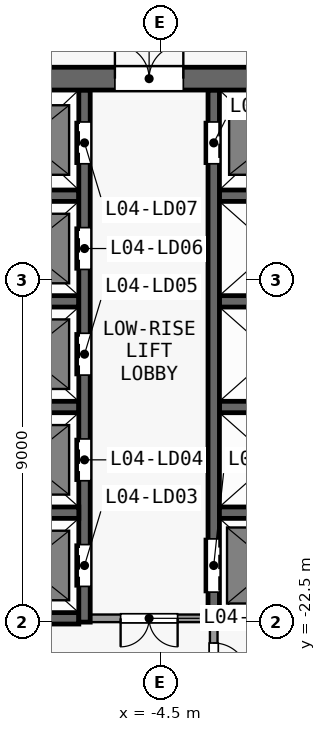
"""IFC4 building model, lengths in metres.
Left out: names, types, materials, properties, quantities, classifications, styles, units other than length and angle.
Written with IfcOpenShell. Run it as: python <this file> out.ifc"""

import sys

from ifc_helpers import new_model, si_unit, direction, frame, frame_2d, origin, place, context, subcontext, project, spatial, rectangle, extrude, element, fill, save


model = new_model("IFC4")
c1 = context("Model", 3, precision=1e-05, world=origin(), true_north=direction((0.0, 1.0)))
c2 = subcontext(c1, "Body", "Model", "MODEL_VIEW")
j1 = project(units=[si_unit("LENGTHUNIT", "METRE"), si_unit("PLANEANGLEUNIT", "RADIAN")], contexts=[c1])
p1 = place(None, origin())
s1 = spatial("IfcSite", under=j1, at=p1, CompositionType="ELEMENT")
p2 = place(p1, origin())
s2 = spatial("IfcBuilding", under=s1, at=p2, CompositionType="ELEMENT")
p3 = place(p2, frame((0.0, 0.0, 23.5)))
s3 = spatial("IfcBuildingStorey", under=s2, at=p3, CompositionType="ELEMENT", Elevation=23.5)
p4 = place(p3, frame((-13.5, -8.2, 0.0), z_axis=(0.0, 0.0, 1.0), x_axis=(1.0, 0.0, 0.0)))
e1 = element("IfcWall", 1, at=p4, inside=s3, PredefinedType="SHEAR", context=c2, shape_type="SweptSolid", body=[
    extrude(rectangle(XDim=27.0, YDim=0.6, at=frame_2d((13.5, 0.0))), origin(), (0.0, 0.0, 1.0), 4.15),
])
p5 = place(p4, frame((7.8, 0.0, 0.0)))
e2 = element("IfcOpeningElement", 2, at=p5, cuts=e1, PredefinedType="OPENING", context=c2, shape_type="SweptSolid", body=[
    extrude(rectangle(XDim=1.8, YDim=2.1, at=frame_2d((0.9, 1.05))), frame((0.0, 0.31, 0.0), z_axis=(0.0, -1.0, 0.0), x_axis=(1.0, 0.0, 0.0)), (0.0, 0.0, 1.0), 0.62),
])
p6 = place(p4, frame((17.4, 0.0, 0.0)))
e3 = element("IfcOpeningElement", 3, at=p6, cuts=e1, PredefinedType="OPENING", context=c2, shape_type="SweptSolid", body=[
    extrude(rectangle(XDim=1.8, YDim=2.1, at=frame_2d((0.9, 1.05))), frame((0.0, 0.31, 0.0), z_axis=(0.0, -1.0, 0.0), x_axis=(1.0, 0.0, 0.0)), (0.0, 0.0, 1.0), 0.62),
])
p7 = place(p4, frame((2.725, 0.0, 0.0)))
e4 = element("IfcOpeningElement", 4, at=p7, cuts=e1, PredefinedType="OPENING", context=c2, shape_type="SweptSolid", body=[
    extrude(rectangle(XDim=0.9, YDim=2.1, at=frame_2d((0.45, 1.05))), frame((0.0, 0.31, 0.0), z_axis=(0.0, -1.0, 0.0), x_axis=(1.0, 0.0, 0.0)), (0.0, 0.0, 1.0), 0.62),
])
p8 = place(p4, frame((23.375, 0.0, 0.0)))
e5 = element("IfcOpeningElement", 5, at=p8, cuts=e1, PredefinedType="OPENING", context=c2, shape_type="SweptSolid", body=[
    extrude(rectangle(XDim=0.9, YDim=2.1, at=frame_2d((0.45, 1.05))), frame((0.0, 0.31, 0.0), z_axis=(0.0, -1.0, 0.0), x_axis=(1.0, 0.0, 0.0)), (0.0, 0.0, 1.0), 0.62),
])
p9 = place(p3, frame((-9.45, -22.4, 0.0), z_axis=(0.0, 0.0, 1.0), x_axis=(1.0, 0.0, 0.0)))
e6 = element("IfcWall", 6, at=p9, inside=s3, PredefinedType="SHEAR", context=c2, shape_type="SweptSolid", body=[
    extrude(rectangle(XDim=2.8, YDim=0.3, at=frame_2d((1.4, 0.0))), origin(), (0.0, 0.0, 1.0), 4.15),
])
p10 = place(p3, frame((-3.25, -22.4, 0.0), z_axis=(0.0, 0.0, 1.0), x_axis=(-1.0, 0.0, 0.0)))
e7 = element("IfcWall", 7, at=p10, inside=s3, PredefinedType="PARTITIONING", context=c2, shape_type="SweptSolid", body=[
    extrude(rectangle(XDim=3.1, YDim=0.2, at=frame_2d((1.55, 0.0))), origin(), (0.0, 0.0, 1.0), 4.15),
])
p11 = place(p10, frame((0.8, 0.0, 0.0)))
e8 = element("IfcOpeningElement", 8, at=p11, cuts=e7, PredefinedType="OPENING", context=c2, shape_type="SweptSolid", body=[
    extrude(rectangle(XDim=1.5, YDim=2.1, at=frame_2d((0.75, 1.05))), frame((0.0, 0.11, 0.0), z_axis=(0.0, -1.0, 0.0), x_axis=(1.0, 0.0, 0.0)), (0.0, 0.0, 1.0), 0.22),
])
p12 = place(p3, frame((-2.95, -22.4, 0.0), z_axis=(0.0, 0.0, 1.0), x_axis=(1.0, 0.0, 0.0)))
e9 = element("IfcWall", 9, at=p12, inside=s3, PredefinedType="SHEAR", context=c2, shape_type="SweptSolid", body=[
    extrude(rectangle(XDim=6.2, YDim=0.3, at=frame_2d((3.1, 0.0))), origin(), (0.0, 0.0, 1.0), 4.15),
])
for number, where, z_axis, x_axis in (
    (10, (-9.45, -19.62, 0.0), (0.0, 0.0, 1.0), (1.0, 0.0, 0.0)),
    (11, (-2.95, -19.62, 0.0), (0.0, 0.0, 1.0), (1.0, 0.0, 0.0)),
    (12, (-9.45, -16.84, 0.0), (0.0, 0.0, 1.0), (1.0, 0.0, 0.0)),
    (13, (-2.95, -16.84, 0.0), (0.0, 0.0, 1.0), (1.0, 0.0, 0.0)),
    (14, (-9.45, -14.06, 0.0), (0.0, 0.0, 1.0), (1.0, 0.0, 0.0)),
    (15, (-2.95, -14.06, 0.0), (0.0, 0.0, 1.0), (1.0, 0.0, 0.0)),
    (16, (-9.45, -11.28, 0.0), (0.0, 0.0, 1.0), (1.0, 0.0, 0.0)),
    (17, (-2.95, -11.28, 0.0), (0.0, 0.0, 1.0), (1.0, 0.0, 0.0)),
):
    element("IfcWall", number, at=place(p3, frame(where, z_axis=z_axis, x_axis=x_axis)), inside=s3, PredefinedType="SHEAR", context=c2, shape_type="SweptSolid", body=[
        extrude(rectangle(XDim=2.8, YDim=0.3, at=frame_2d((1.4, 0.0))), origin(), (0.0, 0.0, 1.0), 4.15),
    ])
p13 = place(p3, frame((-6.5, -22.5, 0.0), z_axis=(0.0, 0.0, 1.0), x_axis=(0.0, 1.0, 0.0)))
e18 = element("IfcWall", 18, at=p13, inside=s3, PredefinedType="SHEAR", context=c2, shape_type="SweptSolid", body=[
    extrude(rectangle(XDim=14.0, YDim=0.3, at=frame_2d((7.0, 0.0))), origin(), (0.0, 0.0, 1.0), 4.15),
])
p14 = place(p13, frame((0.94, 0.0, 0.0)))
e19 = element("IfcOpeningElement", 19, at=p14, cuts=e18, PredefinedType="OPENING", context=c2, shape_type="SweptSolid", body=[
    extrude(rectangle(XDim=1.1, YDim=2.1, at=frame_2d((0.55, 1.05))), frame((0.0, 0.16, 0.0), z_axis=(0.0, -1.0, 0.0), x_axis=(1.0, 0.0, 0.0)), (0.0, 0.0, 1.0), 0.32),
])
p15 = place(p13, frame((3.72, 0.0, 0.0)))
e20 = element("IfcOpeningElement", 20, at=p15, cuts=e18, PredefinedType="OPENING", context=c2, shape_type="SweptSolid", body=[
    extrude(rectangle(XDim=1.1, YDim=2.1, at=frame_2d((0.55, 1.05))), frame((0.0, 0.16, 0.0), z_axis=(0.0, -1.0, 0.0), x_axis=(1.0, 0.0, 0.0)), (0.0, 0.0, 1.0), 0.32),
])
p16 = place(p13, frame((6.5, 0.0, 0.0)))
e21 = element("IfcOpeningElement", 21, at=p16, cuts=e18, PredefinedType="OPENING", context=c2, shape_type="SweptSolid", body=[
    extrude(rectangle(XDim=1.1, YDim=2.1, at=frame_2d((0.55, 1.05))), frame((0.0, 0.16, 0.0), z_axis=(0.0, -1.0, 0.0), x_axis=(1.0, 0.0, 0.0)), (0.0, 0.0, 1.0), 0.32),
])
p17 = place(p13, frame((9.28, 0.0, 0.0)))
e22 = element("IfcOpeningElement", 22, at=p17, cuts=e18, PredefinedType="OPENING", context=c2, shape_type="SweptSolid", body=[
    extrude(rectangle(XDim=1.1, YDim=2.1, at=frame_2d((0.55, 1.05))), frame((0.0, 0.16, 0.0), z_axis=(0.0, -1.0, 0.0), x_axis=(1.0, 0.0, 0.0)), (0.0, 0.0, 1.0), 0.32),
])
p18 = place(p13, frame((12.06, 0.0, 0.0)))
e23 = element("IfcOpeningElement", 23, at=p18, cuts=e18, PredefinedType="OPENING", context=c2, shape_type="SweptSolid", body=[
    extrude(rectangle(XDim=1.1, YDim=2.1, at=frame_2d((0.55, 1.05))), frame((0.0, 0.16, 0.0), z_axis=(0.0, -1.0, 0.0), x_axis=(1.0, 0.0, 0.0)), (0.0, 0.0, 1.0), 0.32),
])
p19 = place(p3, frame((-3.1, -22.55, 0.0), z_axis=(0.0, 0.0, 1.0), x_axis=(0.0, -1.0, 0.0)))
e24 = element("IfcWall", 24, at=p19, inside=s3, PredefinedType="PARTITIONING", context=c2, shape_type="SweptSolid", body=[
    extrude(rectangle(XDim=2.05, YDim=0.2, at=frame_2d((1.025, 0.0))), origin(), (0.0, 0.0, 1.0), 4.15),
])
p20 = place(p19, frame((0.5, 0.0, 0.0)))
e25 = element("IfcOpeningElement", 25, at=p20, cuts=e24, PredefinedType="OPENING", context=c2, shape_type="SweptSolid", body=[
    extrude(rectangle(XDim=0.9, YDim=2.1, at=frame_2d((0.45, 1.05))), frame((0.0, 0.11, 0.0), z_axis=(0.0, -1.0, 0.0), x_axis=(1.0, 0.0, 0.0)), (0.0, 0.0, 1.0), 0.22),
])
p21 = place(p3, frame((-3.1, -22.55, 0.0), z_axis=(0.0, 0.0, 1.0), x_axis=(0.0, 1.0, 0.0)))
e26 = element("IfcWall", 26, at=p21, inside=s3, PredefinedType="SHEAR", context=c2, shape_type="SweptSolid", body=[
    extrude(rectangle(XDim=14.05, YDim=0.3, at=frame_2d((7.025, 0.0))), origin(), (0.0, 0.0, 1.0), 4.15),
])
p22 = place(p21, frame((12.11, 0.0, 0.0)))
e27 = element("IfcOpeningElement", 27, at=p22, cuts=e26, PredefinedType="OPENING", context=c2, shape_type="SweptSolid", body=[
    extrude(rectangle(XDim=1.1, YDim=2.1, at=frame_2d((0.55, 1.05))), frame((0.0, 0.16, 0.0), z_axis=(0.0, -1.0, 0.0), x_axis=(1.0, 0.0, 0.0)), (0.0, 0.0, 1.0), 0.32),
])
p23 = place(p21, frame((0.84, 0.0, 0.0)))
e28 = element("IfcOpeningElement", 28, at=p23, cuts=e26, PredefinedType="OPENING", context=c2, shape_type="SweptSolid", body=[
    extrude(rectangle(XDim=1.4, YDim=2.1, at=frame_2d((0.7, 1.05))), frame((0.0, 0.16, 0.0), z_axis=(0.0, -1.0, 0.0), x_axis=(1.0, 0.0, 0.0)), (0.0, 0.0, 1.0), 0.32),
])
p24 = place(p14, origin())
e29 = element("IfcDoor", 29, at=p24, inside=s3, OperationType="DOUBLE_DOOR_SLIDING", PredefinedType="DOOR", context=c2, shape_type="SweptSolid", body=[
    extrude(rectangle(XDim=1.1, YDim=2.1, at=frame_2d((0.55, 1.05))), frame((0.0, 0.025, 0.0), z_axis=(0.0, -1.0, 0.0), x_axis=(1.0, 0.0, 0.0)), (0.0, 0.0, 1.0), 0.05),
])
fill(e19, e29)
p25 = place(p15, origin())
e30 = element("IfcDoor", 30, at=p25, inside=s3, OperationType="DOUBLE_DOOR_SLIDING", PredefinedType="DOOR", context=c2, shape_type="SweptSolid", body=[
    extrude(rectangle(XDim=1.1, YDim=2.1, at=frame_2d((0.55, 1.05))), frame((0.0, 0.025, 0.0), z_axis=(0.0, -1.0, 0.0), x_axis=(1.0, 0.0, 0.0)), (0.0, 0.0, 1.0), 0.05),
])
fill(e20, e30)
p26 = place(p16, origin())
e31 = element("IfcDoor", 31, at=p26, inside=s3, OperationType="DOUBLE_DOOR_SLIDING", PredefinedType="DOOR", context=c2, shape_type="SweptSolid", body=[
    extrude(rectangle(XDim=1.1, YDim=2.1, at=frame_2d((0.55, 1.05))), frame((0.0, 0.025, 0.0), z_axis=(0.0, -1.0, 0.0), x_axis=(1.0, 0.0, 0.0)), (0.0, 0.0, 1.0), 0.05),
])
fill(e21, e31)
p27 = place(p17, origin())
e32 = element("IfcDoor", 32, at=p27, inside=s3, OperationType="DOUBLE_DOOR_SLIDING", PredefinedType="DOOR", context=c2, shape_type="SweptSolid", body=[
    extrude(rectangle(XDim=1.1, YDim=2.1, at=frame_2d((0.55, 1.05))), frame((0.0, 0.025, 0.0), z_axis=(0.0, -1.0, 0.0), x_axis=(1.0, 0.0, 0.0)), (0.0, 0.0, 1.0), 0.05),
])
fill(e22, e32)
p28 = place(p18, origin())
e33 = element("IfcDoor", 33, at=p28, inside=s3, OperationType="DOUBLE_DOOR_SLIDING", PredefinedType="DOOR", context=c2, shape_type="SweptSolid", body=[
    extrude(rectangle(XDim=1.1, YDim=2.1, at=frame_2d((0.55, 1.05))), frame((0.0, 0.025, 0.0), z_axis=(0.0, -1.0, 0.0), x_axis=(1.0, 0.0, 0.0)), (0.0, 0.0, 1.0), 0.05),
])
fill(e23, e33)
p29 = place(p22, origin())
e34 = element("IfcDoor", 34, at=p29, inside=s3, OperationType="DOUBLE_DOOR_SLIDING", PredefinedType="DOOR", context=c2, shape_type="SweptSolid", body=[
    extrude(rectangle(XDim=1.1, YDim=2.1, at=frame_2d((0.55, 1.05))), frame((0.0, 0.025, 0.0), z_axis=(0.0, -1.0, 0.0), x_axis=(1.0, 0.0, 0.0)), (0.0, 0.0, 1.0), 0.05),
])
fill(e27, e34)
p30 = place(p23, origin())
e35 = element("IfcDoor", 35, at=p30, inside=s3, OperationType="DOUBLE_DOOR_SLIDING", PredefinedType="DOOR", context=c2, shape_type="SweptSolid", body=[
    extrude(rectangle(XDim=1.4, YDim=2.1, at=frame_2d((0.7, 1.05))), frame((0.0, 0.025, 0.0), z_axis=(0.0, -1.0, 0.0), x_axis=(1.0, 0.0, 0.0)), (0.0, 0.0, 1.0), 0.05),
])
fill(e28, e35)
p31 = place(p11, origin())
e36 = element("IfcDoor", 36, at=p31, inside=s3, OperationType="DOUBLE_DOOR_SINGLE_SWING", PredefinedType="DOOR", context=c2, shape_type="SweptSolid", body=[
    extrude(rectangle(XDim=1.5, YDim=2.1, at=frame_2d((0.75, 1.05))), frame((0.0, 0.025, 0.0), z_axis=(0.0, -1.0, 0.0), x_axis=(1.0, 0.0, 0.0)), (0.0, 0.0, 1.0), 0.05),
])
fill(e8, e36)
p32 = place(p5, origin())
e37 = element("IfcDoor", 37, at=p32, inside=s3, OperationType="DOUBLE_DOOR_SINGLE_SWING", PredefinedType="DOOR", context=c2, shape_type="SweptSolid", body=[
    extrude(rectangle(XDim=1.8, YDim=2.1, at=frame_2d((0.9, 1.05))), frame((0.0, 0.025, 0.0), z_axis=(0.0, -1.0, 0.0), x_axis=(1.0, 0.0, 0.0)), (0.0, 0.0, 1.0), 0.05),
])
fill(e2, e37)
p33 = place(p20, origin())
e38 = element("IfcDoor", 38, at=p33, inside=s3, OperationType="SINGLE_SWING_RIGHT", PredefinedType="DOOR", context=c2, shape_type="SweptSolid", body=[
    extrude(rectangle(XDim=0.9, YDim=2.1, at=frame_2d((0.45, 1.05))), frame((0.0, 0.025, 0.0), z_axis=(0.0, -1.0, 0.0), x_axis=(1.0, 0.0, 0.0)), (0.0, 0.0, 1.0), 0.05),
])
fill(e25, e38)
save(model, sys.argv[1])
